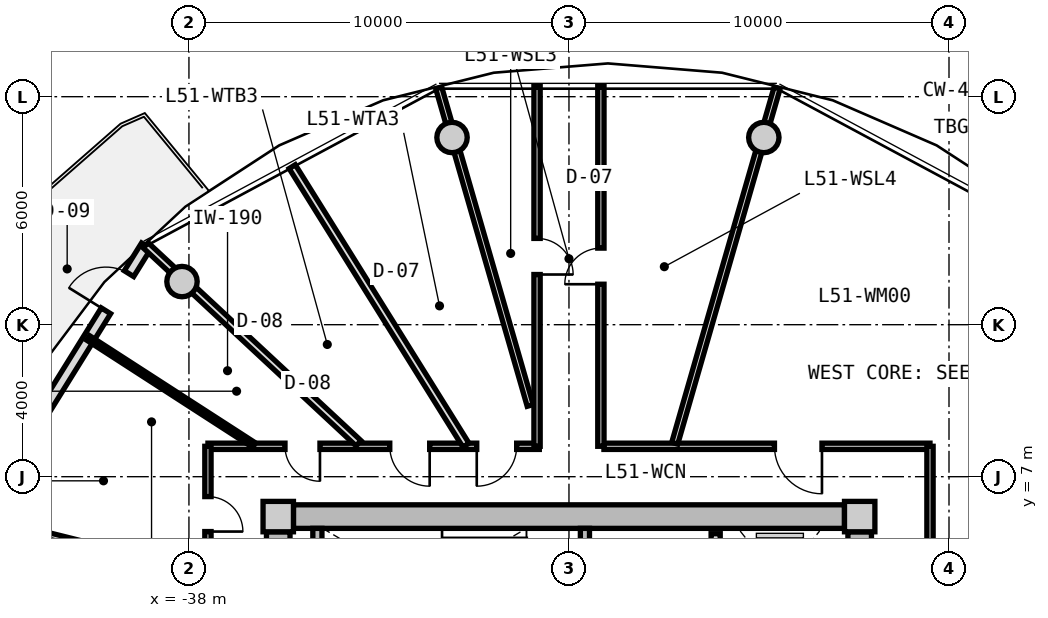
"""IFC4 building model, lengths in metres.
Left out: names, types, materials, properties, quantities, classifications, styles, units other than length and angle.
Written with IfcOpenShell. Run it as: python <this file> out.ifc"""

import sys

from ifc_helpers import new_model, si_unit, direction, frame, frame_2d, origin, origin_2d, place, context, subcontext, project, spatial, rectangle, circle, extrude, source, transform, mapped, element, fill, save


model = new_model("IFC4")
c1 = context("Model", 3, precision=1e-05, world=origin(), true_north=direction((0.0, 1.0)))
c2 = subcontext(c1, "Body", "Model", "MODEL_VIEW")
j1 = project(units=[si_unit("LENGTHUNIT", "METRE"), si_unit("PLANEANGLEUNIT", "RADIAN")], contexts=[c1])
p1 = place(None, origin())
s1 = spatial("IfcSite", under=j1, at=p1, CompositionType="ELEMENT")
p2 = place(p1, origin())
s2 = spatial("IfcBuilding", under=s1, at=p2, CompositionType="ELEMENT")
p3 = place(p2, frame((0.0, 0.0, 164.8)))
s3 = spatial("IfcBuildingStorey", under=s2, at=p3, CompositionType="ELEMENT", Elevation=164.8)
m1 = source(origin(), c2, "Body", "SweptSolid", [
    extrude(rectangle(XDim=0.8, YDim=0.8, at=origin_2d()), origin(), (0.0, 0.0, 1.0), 3.05),
])
for number, where, z_axis, x_axis in (
    (1, (-20.35, 5.95, 0.0), (0.0, 0.0, 1.0), (1.0, 0.0, 0.0)),
    (2, (-35.65, 5.95, 0.0), (0.0, 0.0, 1.0), (1.0, 0.0, 0.0)),
):
    element("IfcColumn", number, at=place(p3, frame(where, z_axis=z_axis, x_axis=x_axis)), inside=s3, PredefinedType="COLUMN", context=c2, shape_type="MappedRepresentation", body=[
        mapped(m1, transform((0.0, 0.0, 0.0), x_axis=(1.0, 0.0, 0.0), y_axis=(0.0, 1.0, 0.0), z_axis=(0.0, 0.0, 1.0), scale=1.0)),
    ])
m2 = source(origin(), c2, "Body", "SweptSolid", [
    extrude(rectangle(XDim=14.5, YDim=0.62, at=frame_2d((7.25, 0.0))), origin(), (0.0, 0.0, 1.0), 2.81),
])
p4 = place(p3, frame((-35.25, 5.95, 0.0), z_axis=(0.0, 0.0, 1.0), x_axis=(1.0, 0.0, 0.0)))
e3 = element("IfcWall", 3, at=p4, inside=s3, PredefinedType="SHEAR", context=c2, shape_type="MappedRepresentation", body=[
    mapped(m2, transform((0.0, 0.0, 0.0), x_axis=(1.0, 0.0, 0.0), y_axis=(0.0, 1.0, 0.0), z_axis=(0.0, 0.0, 1.0), scale=1.0)),
])
m3 = source(origin(), c2, "Body", "SweptSolid", [
    extrude(rectangle(XDim=11.1, YDim=0.62, at=frame_2d((5.55, 0.0))), origin(), (0.0, 0.0, 1.0), 2.81),
])
p5 = place(p3, frame((-35.65, -5.55, 0.0), z_axis=(0.0, 0.0, 1.0), x_axis=(0.0, 1.0, 0.0)))
e4 = element("IfcWall", 4, at=p5, inside=s3, PredefinedType="SHEAR", context=c2, shape_type="MappedRepresentation", body=[
    mapped(m3, transform((0.0, 0.0, 0.0), x_axis=(1.0, 0.0, 0.0), y_axis=(0.0, 1.0, 0.0), z_axis=(0.0, 0.0, 1.0), scale=1.0)),
])
p6 = place(p5, frame((3.8, 0.0, 0.0)))
e5 = element("IfcOpeningElement", 5, at=p6, cuts=e4, PredefinedType="OPENING", context=c2, shape_type="SweptSolid", body=[
    extrude(rectangle(XDim=1.2, YDim=2.15, at=frame_2d((0.6, 1.075))), frame((0.0, 0.32, 0.0), z_axis=(0.0, -1.0, 0.0), x_axis=(1.0, 0.0, 0.0)), (0.0, 0.0, 1.0), 0.64),
])
p7 = place(p3, frame((-20.35, 5.55, 0.0), z_axis=(0.0, 0.0, 1.0), x_axis=(0.0, -1.0, 0.0)))
e6 = element("IfcWall", 6, at=p7, inside=s3, PredefinedType="SHEAR", context=c2, shape_type="MappedRepresentation", body=[
    mapped(m3, transform((0.0, 0.0, 0.0), x_axis=(1.0, 0.0, 0.0), y_axis=(0.0, 1.0, 0.0), z_axis=(0.0, 0.0, 1.0), scale=1.0)),
])
p8 = place(p7, frame((5.65, 0.0, 0.0)))
e7 = element("IfcOpeningElement", 7, at=p8, cuts=e6, PredefinedType="OPENING", context=c2, shape_type="SweptSolid", body=[
    extrude(rectangle(XDim=1.2, YDim=2.15, at=frame_2d((0.6, 1.075))), frame((0.0, 0.32, 0.0), z_axis=(0.0, -1.0, 0.0), x_axis=(1.0, 0.0, 0.0)), (0.0, 0.0, 1.0), 0.64),
])
m4 = source(origin(), c2, "Body", "SweptSolid", [
    extrude(circle(Radius=0.4, at=origin_2d()), origin(), (0.0, 0.0, 1.0), 3.05),
])
for number, where, z_axis, x_axis in (
    (8, (-22.873, 15.926, 0.0), (0.0, 0.0, 1.0), (1.0, 0.0, 0.0)),
    (9, (-31.077, 15.926, 0.0), (0.0, 0.0, 1.0), (1.0, 0.0, 0.0)),
    (10, (-38.183, 12.135, 0.0), (0.0, 0.0, 1.0), (1.0, 0.0, 0.0)),
):
    element("IfcColumn", number, at=place(p3, frame(where, z_axis=z_axis, x_axis=x_axis)), inside=s3, PredefinedType="COLUMN", context=c2, shape_type="MappedRepresentation", body=[
        mapped(m4, transform((0.0, 0.0, 0.0), x_axis=(1.0, 0.0, 0.0), y_axis=(0.0, 1.0, 0.0), z_axis=(0.0, 0.0, 1.0), scale=1.0)),
    ])
m5 = source(origin(), c2, "Body", "SweptSolid", [
    extrude(rectangle(XDim=8.431, YDim=0.29, at=frame_2d((4.216, 0.0))), origin(), (0.0, 0.0, 1.0), 2.81),
])
p9 = place(p3, frame((-43.57, 5.911, 0.0), z_axis=(0.0, 0.0, 1.0), x_axis=(0.527377998418, 0.849630770855, 0.0)))
e11 = element("IfcWall", 11, at=p9, inside=s3, PredefinedType="SOLIDWALL", context=c2, shape_type="MappedRepresentation", body=[
    mapped(m5, transform((0.0, 0.0, 0.0), x_axis=(1.0, 0.0, 0.0), y_axis=(0.0, 1.0, 0.0), z_axis=(0.0, 0.0, 1.0), scale=1.0)),
])
p10 = place(p9, frame((6.42, 0.0, 0.0)))
e12 = element("IfcOpeningElement", 12, at=p10, cuts=e11, PredefinedType="OPENING", context=c2, shape_type="SweptSolid", body=[
    extrude(rectangle(XDim=1.15, YDim=2.25, at=frame_2d((0.575, 1.125))), frame((0.0, 0.155, 0.0), z_axis=(0.0, -1.0, 0.0), x_axis=(1.0, 0.0, 0.0)), (0.0, 0.0, 1.0), 0.31),
])
p11 = place(p9, frame((0.85, 0.0, 0.85)))
e13 = element("IfcOpeningElement", 13, at=p11, cuts=e11, PredefinedType="OPENING", context=c2, shape_type="SweptSolid", body=[
    extrude(rectangle(XDim=1.2, YDim=1.5, at=frame_2d((0.6, 0.75))), frame((0.0, 0.155, 0.0), z_axis=(0.0, -1.0, 0.0), x_axis=(1.0, 0.0, 0.0)), (0.0, 0.0, 1.0), 0.31),
])
m6 = source(origin(), c2, "Body", "SweptSolid", [
    extrude(rectangle(XDim=3.19, YDim=0.24, at=frame_2d((1.595, 0.0))), origin(), (0.0, 0.0, 1.0), 2.81),
])
p12 = place(p3, frame((-34.62, 2.45, 0.0), z_axis=(0.0, 0.0, 1.0), x_axis=(0.0, 1.0, 0.0)))
e14 = element("IfcWall", 14, at=p12, inside=s3, PredefinedType="PARTITIONING", context=c2, shape_type="MappedRepresentation", body=[
    mapped(m6, transform((0.0, 0.0, 0.0), x_axis=(1.0, 0.0, 0.0), y_axis=(0.0, 1.0, 0.0), z_axis=(0.0, 0.0, 1.0), scale=1.0)),
])
p13 = place(p3, frame((-27.58, 2.45, 0.0), z_axis=(0.0, 0.0, 1.0), x_axis=(0.0, 1.0, 0.0)))
e15 = element("IfcWall", 15, at=p13, inside=s3, PredefinedType="PARTITIONING", context=c2, shape_type="MappedRepresentation", body=[
    mapped(m6, transform((0.0, 0.0, 0.0), x_axis=(1.0, 0.0, 0.0), y_axis=(0.0, 1.0, 0.0), z_axis=(0.0, 0.0, 1.0), scale=1.0)),
])
p14 = place(p13, frame((0.55, 0.0, 0.0)))
e16 = element("IfcOpeningElement", 16, at=p14, cuts=e15, PredefinedType="OPENING", context=c2, shape_type="SweptSolid", body=[
    extrude(rectangle(XDim=1.1, YDim=2.15, at=frame_2d((0.55, 1.075))), frame((0.0, 0.13, 0.0), z_axis=(0.0, -1.0, 0.0), x_axis=(1.0, 0.0, 0.0)), (0.0, 0.0, 1.0), 0.26),
])
m7 = source(origin(), c2, "Body", "SweptSolid", [
    extrude(rectangle(XDim=5.0, YDim=0.24, at=frame_2d((2.5, 0.0))), origin(), (0.0, 0.0, 1.0), 2.795),
])
p15 = place(p3, frame((-24.14, 0.5, 0.0), z_axis=(0.0, 0.0, 1.0), x_axis=(0.0, 1.0, 0.0)))
e17 = element("IfcWall", 17, at=p15, inside=s3, PredefinedType="PARTITIONING", context=c2, shape_type="MappedRepresentation", body=[
    mapped(m7, transform((0.0, 0.0, 0.0), x_axis=(1.0, 0.0, 0.0), y_axis=(0.0, 1.0, 0.0), z_axis=(0.0, 0.0, 1.0), scale=1.0)),
])
p16 = place(p15, frame((3.05, 0.0, 0.0)))
e18 = element("IfcOpeningElement", 18, at=p16, cuts=e17, PredefinedType="OPENING", context=c2, shape_type="SweptSolid", body=[
    extrude(rectangle(XDim=1.3, YDim=2.2, at=frame_2d((0.65, 1.1))), frame((0.0, 0.13, 0.0), z_axis=(0.0, -1.0, 0.0), x_axis=(1.0, 0.0, 0.0)), (0.0, 0.0, 1.0), 0.26),
])
p17 = place(p15, frame((0.55, 0.0, 0.0)))
e19 = element("IfcOpeningElement", 19, at=p17, cuts=e17, PredefinedType="OPENING", context=c2, shape_type="SweptSolid", body=[
    extrude(rectangle(XDim=1.3, YDim=2.2, at=frame_2d((0.65, 1.1))), frame((0.0, 0.13, 0.0), z_axis=(0.0, -1.0, 0.0), x_axis=(1.0, 0.0, 0.0)), (0.0, 0.0, 1.0), 0.26),
])
m8 = source(origin(), c2, "Body", "SweptSolid", [
    extrude(rectangle(XDim=8.719, YDim=0.165, at=frame_2d((4.36, 0.0))), origin(), (0.0, 0.0, 1.0), 2.795),
])
p18 = place(p3, frame((-37.5, 7.8, 0.0), z_axis=(0.0, 0.0, 1.0), x_axis=(1.0, 0.0, 0.0)))
e20 = element("IfcWall", 20, at=p18, inside=s3, PredefinedType="PARTITIONING", context=c2, shape_type="MappedRepresentation", body=[
    mapped(m8, transform((0.0, 0.0, 0.0), x_axis=(1.0, 0.0, 0.0), y_axis=(0.0, 1.0, 0.0), z_axis=(0.0, 0.0, 1.0), scale=1.0)),
])
p19 = place(p18, frame((7.073, 0.0, 0.0)))
e21 = element("IfcOpeningElement", 21, at=p19, cuts=e20, PredefinedType="OPENING", context=c2, shape_type="SweptSolid", body=[
    extrude(rectangle(XDim=1.05, YDim=2.15, at=frame_2d((0.525, 1.075))), frame((0.0, 0.093, 0.0), z_axis=(0.0, -1.0, 0.0), x_axis=(1.0, 0.0, 0.0)), (0.0, 0.0, 1.0), 0.185),
])
p20 = place(p18, frame((4.785, 0.0, 0.0)))
e22 = element("IfcOpeningElement", 22, at=p20, cuts=e20, PredefinedType="OPENING", context=c2, shape_type="SweptSolid", body=[
    extrude(rectangle(XDim=1.05, YDim=2.15, at=frame_2d((0.525, 1.075))), frame((0.0, 0.093, 0.0), z_axis=(0.0, -1.0, 0.0), x_axis=(1.0, 0.0, 0.0)), (0.0, 0.0, 1.0), 0.185),
])
p21 = place(p18, frame((2.028, 0.0, 0.0)))
e23 = element("IfcOpeningElement", 23, at=p21, cuts=e20, PredefinedType="OPENING", context=c2, shape_type="SweptSolid", body=[
    extrude(rectangle(XDim=0.92, YDim=2.1, at=frame_2d((0.46, 1.05))), frame((0.0, 0.093, 0.0), z_axis=(0.0, -1.0, 0.0), x_axis=(1.0, 0.0, 0.0)), (0.0, 0.0, 1.0), 0.185),
])
m9 = source(origin(), c2, "Body", "SweptSolid", [
    extrude(rectangle(XDim=8.58, YDim=0.165, at=frame_2d((4.29, 0.0))), origin(), (0.0, 0.0, 1.0), 2.795),
])
p22 = place(p3, frame((-27.08, 7.8, 0.0), z_axis=(0.0, 0.0, 1.0), x_axis=(1.0, 0.0, 0.0)))
e24 = element("IfcWall", 24, at=p22, inside=s3, PredefinedType="PARTITIONING", context=c2, shape_type="MappedRepresentation", body=[
    mapped(m9, transform((0.0, 0.0, 0.0), x_axis=(1.0, 0.0, 0.0), y_axis=(0.0, 1.0, 0.0), z_axis=(0.0, 0.0, 1.0), scale=1.0)),
])
p23 = place(p22, frame((4.487, 0.0, 0.0)))
e25 = element("IfcOpeningElement", 25, at=p23, cuts=e24, PredefinedType="OPENING", context=c2, shape_type="SweptSolid", body=[
    extrude(rectangle(XDim=1.25, YDim=2.2, at=frame_2d((0.625, 1.1))), frame((0.0, 0.093, 0.0), z_axis=(0.0, -1.0, 0.0), x_axis=(1.0, 0.0, 0.0)), (0.0, 0.0, 1.0), 0.185),
])
m10 = source(origin(), c2, "Body", "SweptSolid", [
    extrude(rectangle(XDim=6.88, YDim=0.165, at=frame_2d((3.44, 0.0))), origin(), (0.0, 0.0, 1.0), 2.795),
])
p24 = place(p3, frame((-37.5, 0.92, 0.0), z_axis=(0.0, 0.0, 1.0), x_axis=(0.0, 1.0, 0.0)))
e26 = element("IfcWall", 26, at=p24, inside=s3, PredefinedType="PARTITIONING", context=c2, shape_type="MappedRepresentation", body=[
    mapped(m10, transform((0.0, 0.0, 0.0), x_axis=(1.0, 0.0, 0.0), y_axis=(0.0, 1.0, 0.0), z_axis=(0.0, 0.0, 1.0), scale=1.0)),
])
p25 = place(p24, frame((4.636, 0.0, 0.0)))
e27 = element("IfcOpeningElement", 27, at=p25, cuts=e26, PredefinedType="OPENING", context=c2, shape_type="SweptSolid", body=[
    extrude(rectangle(XDim=0.92, YDim=2.1, at=frame_2d((0.46, 1.05))), frame((0.0, 0.093, 0.0), z_axis=(0.0, -1.0, 0.0), x_axis=(1.0, 0.0, 0.0)), (0.0, 0.0, 1.0), 0.185),
])
p26 = place(p3, frame((-18.5, 7.8, 0.0), z_axis=(0.0, 0.0, 1.0), x_axis=(0.0, -1.0, 0.0)))
e28 = element("IfcWall", 28, at=p26, inside=s3, PredefinedType="PARTITIONING", context=c2, shape_type="MappedRepresentation", body=[
    mapped(m10, transform((0.0, 0.0, 0.0), x_axis=(1.0, 0.0, 0.0), y_axis=(0.0, 1.0, 0.0), z_axis=(0.0, 0.0, 1.0), scale=1.0)),
])
m11 = source(origin(), c2, "Body", "SweptSolid", [
    extrude(rectangle(XDim=9.73, YDim=0.165, at=frame_2d((4.865, 0.0))), origin(), (0.0, 0.0, 1.0), 2.345),
])
p27 = place(p3, frame((-25.217, 7.88, 0.0), z_axis=(0.0, 0.0, 1.0), x_axis=(0.27679492614, 0.960929013436, 0.0)))
e29 = element("IfcWall", 29, at=p27, inside=s3, PredefinedType="PARTITIONING", context=c2, shape_type="MappedRepresentation", body=[
    mapped(m11, transform((0.0, 0.0, 0.0), x_axis=(1.0, 0.0, 0.0), y_axis=(0.0, 1.0, 0.0), z_axis=(0.0, 0.0, 1.0), scale=1.0)),
])
m12 = source(origin(), c2, "Body", "SweptSolid", [
    extrude(rectangle(XDim=8.695, YDim=0.165, at=frame_2d((4.348, 0.0))), origin(), (0.0, 0.0, 1.0), 2.345),
])
p28 = place(p3, frame((-29.02, 8.875, 0.0), z_axis=(0.0, 0.0, 1.0), x_axis=(-0.276797231892, 0.960928349263, 0.0)))
e30 = element("IfcWall", 30, at=p28, inside=s3, PredefinedType="PARTITIONING", context=c2, shape_type="MappedRepresentation", body=[
    mapped(m12, transform((0.0, 0.0, 0.0), x_axis=(1.0, 0.0, 0.0), y_axis=(0.0, 1.0, 0.0), z_axis=(0.0, 0.0, 1.0), scale=1.0)),
])
m13 = source(origin(), c2, "Body", "SweptSolid", [
    extrude(rectangle(XDim=6.193, YDim=0.165, at=frame_2d((3.096, 0.0))), origin(), (0.0, 0.0, 1.0), 2.345),
])
p29 = place(p3, frame((-37.58, 4.419, 0.0), z_axis=(0.0, 0.0, 1.0), x_axis=(-0.970309243466, 0.241867674657, 0.0)))
e31 = element("IfcWall", 31, at=p29, inside=s3, PredefinedType="PARTITIONING", context=c2, shape_type="MappedRepresentation", body=[
    mapped(m13, transform((0.0, 0.0, 0.0), x_axis=(1.0, 0.0, 0.0), y_axis=(0.0, 1.0, 0.0), z_axis=(0.0, 0.0, 1.0), scale=1.0)),
])
m14 = source(origin(), c2, "Body", "SweptSolid", [
    extrude(rectangle(XDim=8.305, YDim=0.165, at=frame_2d((4.153, 0.0))), origin(), (0.0, 0.0, 1.0), 2.345),
])
p30 = place(p3, frame((-18.42, 3.908, 0.0), z_axis=(0.0, 0.0, 1.0), x_axis=(0.970309994378, 0.241864662175, 0.0)))
e32 = element("IfcWall", 32, at=p30, inside=s3, PredefinedType="PARTITIONING", context=c2, shape_type="MappedRepresentation", body=[
    mapped(m14, transform((0.0, 0.0, 0.0), x_axis=(1.0, 0.0, 0.0), y_axis=(0.0, 1.0, 0.0), z_axis=(0.0, 0.0, 1.0), scale=1.0)),
])
m15 = source(origin(), c2, "Body", "SweptSolid", [
    extrude(rectangle(XDim=9.48, YDim=0.165, at=frame_2d((4.74, 0.0))), origin(), (0.0, 0.0, 1.0), 2.795),
])
p31 = place(p3, frame((-28.84, 7.8, 0.0), z_axis=(0.0, 0.0, 1.0), x_axis=(0.0, 1.0, 0.0)))
e33 = element("IfcWall", 33, at=p31, inside=s3, PredefinedType="PARTITIONING", context=c2, shape_type="MappedRepresentation", body=[
    mapped(m15, transform((0.0, 0.0, 0.0), x_axis=(1.0, 0.0, 0.0), y_axis=(0.0, 1.0, 0.0), z_axis=(0.0, 0.0, 1.0), scale=1.0)),
])
p32 = place(p31, frame((4.521, 0.0, 0.0)))
e34 = element("IfcOpeningElement", 34, at=p32, cuts=e33, PredefinedType="OPENING", context=c2, shape_type="SweptSolid", body=[
    extrude(rectangle(XDim=0.95, YDim=2.1, at=frame_2d((0.475, 1.05))), frame((0.0, 0.093, 0.0), z_axis=(0.0, -1.0, 0.0), x_axis=(1.0, 0.0, 0.0)), (0.0, 0.0, 1.0), 0.185),
])
p33 = place(p3, frame((-27.16, 17.28, 0.0), z_axis=(0.0, 0.0, 1.0), x_axis=(0.0, -1.0, 0.0)))
e35 = element("IfcWall", 35, at=p33, inside=s3, PredefinedType="PARTITIONING", context=c2, shape_type="MappedRepresentation", body=[
    mapped(m15, transform((0.0, 0.0, 0.0), x_axis=(1.0, 0.0, 0.0), y_axis=(0.0, 1.0, 0.0), z_axis=(0.0, 0.0, 1.0), scale=1.0)),
])
p34 = place(p33, frame((4.265, 0.0, 0.0)))
e36 = element("IfcOpeningElement", 36, at=p34, cuts=e35, PredefinedType="OPENING", context=c2, shape_type="SweptSolid", body=[
    extrude(rectangle(XDim=0.95, YDim=2.1, at=frame_2d((0.475, 1.05))), frame((0.0, 0.093, 0.0), z_axis=(0.0, -1.0, 0.0), x_axis=(1.0, 0.0, 0.0)), (0.0, 0.0, 1.0), 0.185),
])
m16 = source(origin(), c2, "Body", "SweptSolid", [
    extrude(rectangle(XDim=7.648, YDim=0.19, at=frame_2d((3.824, 0.0))), origin(), (0.0, 0.0, 1.0), 2.345),
])
p35 = place(p3, frame((-33.538, 7.88, 0.0), z_axis=(0.0, 0.0, 1.0), x_axis=(-0.732167856666, 0.681124239522, 0.0)))
e37 = element("IfcWall", 37, at=p35, inside=s3, PredefinedType="PARTITIONING", context=c2, shape_type="MappedRepresentation", body=[
    mapped(m16, transform((0.0, 0.0, 0.0), x_axis=(1.0, 0.0, 0.0), y_axis=(0.0, 1.0, 0.0), z_axis=(0.0, 0.0, 1.0), scale=1.0)),
])
m17 = source(origin(), c2, "Body", "SweptSolid", [
    extrude(rectangle(XDim=8.638, YDim=0.19, at=frame_2d((4.319, 0.0))), origin(), (0.0, 0.0, 1.0), 2.795),
])
p36 = place(p3, frame((-30.711, 7.83, 0.0), z_axis=(0.0, 0.0, 1.0), x_axis=(-0.529150133108, 0.848528217935, 0.0)))
e38 = element("IfcWall", 38, at=p36, inside=s3, PredefinedType="PARTITIONING", context=c2, shape_type="MappedRepresentation", body=[
    mapped(m17, transform((0.0, 0.0, 0.0), x_axis=(1.0, 0.0, 0.0), y_axis=(0.0, 1.0, 0.0), z_axis=(0.0, 0.0, 1.0), scale=1.0)),
])
m18 = source(origin(), c2, "Body", "SweptSolid", [
    extrude(rectangle(XDim=5.197, YDim=0.14, at=frame_2d((2.598, 0.0))), origin(), (0.0, 0.0, 1.0), 2.795),
])
p37 = place(p3, frame((-36.286, 7.83, 0.0), z_axis=(0.0, 0.0, 1.0), x_axis=(-0.839929187515, 0.542696010637, 0.0)))
e39 = element("IfcWall", 39, at=p37, inside=s3, PredefinedType="PARTITIONING", context=c2, shape_type="MappedRepresentation", body=[
    mapped(m18, transform((0.0, 0.0, 0.0), x_axis=(1.0, 0.0, 0.0), y_axis=(0.0, 1.0, 0.0), z_axis=(0.0, 0.0, 1.0), scale=1.0)),
])
m19 = source(origin(), c2, "Body", "SweptSolid", [
    extrude(rectangle(XDim=1.15, YDim=2.25, at=frame_2d((0.575, 1.125))), frame((0.0, 0.025, 0.0), z_axis=(0.0, -1.0, 0.0), x_axis=(1.0, 0.0, 0.0)), (0.0, 0.0, 1.0), 0.05),
])
p38 = place(p10, origin())
e40 = element("IfcDoor", 40, at=p38, inside=s3, OperationType="SINGLE_SWING_LEFT", PredefinedType="DOOR", context=c2, shape_type="MappedRepresentation", body=[
    mapped(m19, transform((0.0, 0.0, 0.0), x_axis=(1.0, 0.0, 0.0), y_axis=(0.0, 1.0, 0.0), z_axis=(0.0, 0.0, 1.0), scale=1.0)),
])
fill(e12, e40)
m20 = source(origin(), c2, "Body", "SweptSolid", [
    extrude(rectangle(XDim=0.95, YDim=2.1, at=frame_2d((0.475, 1.05))), frame((0.0, 0.025, 0.0), z_axis=(0.0, -1.0, 0.0), x_axis=(1.0, 0.0, 0.0)), (0.0, 0.0, 1.0), 0.05),
])
p39 = place(p32, frame((0.95, 0.0, 0.0), z_axis=(0.0, 0.0, 1.0), x_axis=(-1.0, 0.0, 0.0)))
e41 = element("IfcDoor", 41, at=p39, inside=s3, OperationType="SINGLE_SWING_RIGHT", PredefinedType="DOOR", context=c2, shape_type="MappedRepresentation", body=[
    mapped(m20, transform((0.0, 0.0, 0.0), x_axis=(1.0, 0.0, 0.0), y_axis=(0.0, 1.0, 0.0), z_axis=(0.0, 0.0, 1.0), scale=1.0)),
])
fill(e34, e41)
p40 = place(p34, frame((0.95, 0.0, 0.0), z_axis=(0.0, 0.0, 1.0), x_axis=(-1.0, 0.0, 0.0)))
e42 = element("IfcDoor", 42, at=p40, inside=s3, OperationType="SINGLE_SWING_LEFT", PredefinedType="DOOR", context=c2, shape_type="MappedRepresentation", body=[
    mapped(m20, transform((0.0, 0.0, 0.0), x_axis=(1.0, 0.0, 0.0), y_axis=(0.0, 1.0, 0.0), z_axis=(0.0, 0.0, 1.0), scale=1.0)),
])
fill(e36, e42)
m21 = source(origin(), c2, "Body", "SweptSolid", [
    extrude(rectangle(XDim=1.25, YDim=2.2, at=frame_2d((0.625, 1.1))), frame((0.0, 0.025, 0.0), z_axis=(0.0, -1.0, 0.0), x_axis=(1.0, 0.0, 0.0)), (0.0, 0.0, 1.0), 0.05),
])
p41 = place(p23, frame((1.25, 0.0, 0.0), z_axis=(0.0, 0.0, 1.0), x_axis=(-1.0, 0.0, 0.0)))
e43 = element("IfcDoor", 43, at=p41, inside=s3, OperationType="SINGLE_SWING_LEFT", PredefinedType="DOOR", context=c2, shape_type="MappedRepresentation", body=[
    mapped(m21, transform((0.0, 0.0, 0.0), x_axis=(1.0, 0.0, 0.0), y_axis=(0.0, 1.0, 0.0), z_axis=(0.0, 0.0, 1.0), scale=1.0)),
])
fill(e25, e43)
m22 = source(origin(), c2, "Body", "SweptSolid", [
    extrude(rectangle(XDim=1.05, YDim=2.15, at=frame_2d((0.525, 1.075))), frame((0.0, 0.025, 0.0), z_axis=(0.0, -1.0, 0.0), x_axis=(1.0, 0.0, 0.0)), (0.0, 0.0, 1.0), 0.05),
])
p42 = place(p19, frame((1.05, 0.0, 0.0), z_axis=(0.0, 0.0, 1.0), x_axis=(-1.0, 0.0, 0.0)))
e44 = element("IfcDoor", 44, at=p42, inside=s3, OperationType="SINGLE_SWING_RIGHT", PredefinedType="DOOR", context=c2, shape_type="MappedRepresentation", body=[
    mapped(m22, transform((0.0, 0.0, 0.0), x_axis=(1.0, 0.0, 0.0), y_axis=(0.0, 1.0, 0.0), z_axis=(0.0, 0.0, 1.0), scale=1.0)),
])
fill(e21, e44)
p43 = place(p20, frame((1.05, 0.0, 0.0), z_axis=(0.0, 0.0, 1.0), x_axis=(-1.0, 0.0, 0.0)))
e45 = element("IfcDoor", 45, at=p43, inside=s3, OperationType="SINGLE_SWING_LEFT", PredefinedType="DOOR", context=c2, shape_type="MappedRepresentation", body=[
    mapped(m22, transform((0.0, 0.0, 0.0), x_axis=(1.0, 0.0, 0.0), y_axis=(0.0, 1.0, 0.0), z_axis=(0.0, 0.0, 1.0), scale=1.0)),
])
fill(e22, e45)
m23 = source(origin(), c2, "Body", "SweptSolid", [
    extrude(rectangle(XDim=0.92, YDim=2.1, at=frame_2d((0.46, 1.05))), frame((0.0, 0.025, 0.0), z_axis=(0.0, -1.0, 0.0), x_axis=(1.0, 0.0, 0.0)), (0.0, 0.0, 1.0), 0.05),
])
p44 = place(p21, frame((0.92, 0.0, 0.0), z_axis=(0.0, 0.0, 1.0), x_axis=(-1.0, 0.0, 0.0)))
e46 = element("IfcDoor", 46, at=p44, inside=s3, OperationType="SINGLE_SWING_LEFT", PredefinedType="DOOR", context=c2, shape_type="MappedRepresentation", body=[
    mapped(m23, transform((0.0, 0.0, 0.0), x_axis=(1.0, 0.0, 0.0), y_axis=(0.0, 1.0, 0.0), z_axis=(0.0, 0.0, 1.0), scale=1.0)),
])
fill(e23, e46)
p45 = place(p25, frame((0.92, 0.0, 0.0), z_axis=(0.0, 0.0, 1.0), x_axis=(-1.0, 0.0, 0.0)))
e47 = element("IfcDoor", 47, at=p45, inside=s3, OperationType="SINGLE_SWING_RIGHT", PredefinedType="DOOR", context=c2, shape_type="MappedRepresentation", body=[
    mapped(m23, transform((0.0, 0.0, 0.0), x_axis=(1.0, 0.0, 0.0), y_axis=(0.0, 1.0, 0.0), z_axis=(0.0, 0.0, 1.0), scale=1.0)),
])
fill(e27, e47)
save(model, sys.argv[1])
